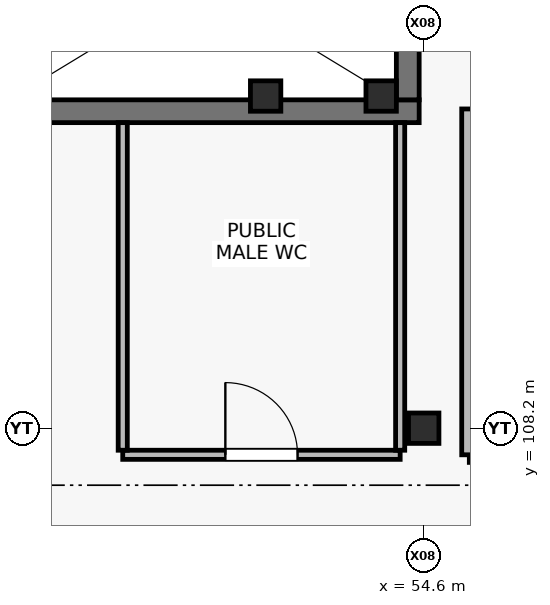
"""IFC4 building model, lengths in metres.
Left out: names, types, materials, properties, quantities, classifications, styles, units other than length and angle.
Written with IfcOpenShell. Run it as: python <this file> out.ifc"""

import sys

from ifc_helpers import new_model, si_unit, direction, frame, frame_2d, origin, origin_2d, place, context, subcontext, project, spatial, rectangle, extrude, element, fill, save


model = new_model("IFC4")
c1 = context("Model", 3, precision=1e-05, world=origin(), true_north=direction((0.0, 1.0)))
c2 = subcontext(c1, "Body", "Model", "MODEL_VIEW")
j1 = project(units=[si_unit("LENGTHUNIT", "METRE"), si_unit("PLANEANGLEUNIT", "RADIAN")], contexts=[c1])
p1 = place(None, origin())
s1 = spatial("IfcSite", under=j1, at=p1, CompositionType="ELEMENT")
p2 = place(p1, origin())
s2 = spatial("IfcBuilding", under=s1, at=p2, CompositionType="ELEMENT")
p3 = place(p2, frame((0.0, 0.0, 23.1)))
s3 = spatial("IfcBuildingStorey", under=s2, at=p3, CompositionType="ELEMENT", Elevation=23.1)
for number, where, z_axis, x_axis in (
    (1, (54.6, 108.2, 0.0), (0.0, 0.0, 1.0), (1.0, 0.0, 0.0)),
    (2, (52.52, 112.57, 0.0), (0.0, 0.0, 1.0), (1.0, 0.0, 0.0)),
    (3, (54.04, 112.57, 0.0), (0.0, 0.0, 1.0), (1.0, 0.0, 0.0)),
):
    element("IfcColumn", number, at=place(p3, frame(where, z_axis=z_axis, x_axis=x_axis)), inside=s3, PredefinedType="COLUMN", context=c2, shape_type="SweptSolid", body=[
        extrude(rectangle(XDim=0.4, YDim=0.4, at=origin_2d()), origin(), (0.0, 0.0, 1.0), 4.2),
    ])
p4 = place(p3, frame((46.95, 112.37, 0.0), z_axis=(0.0, 0.0, 1.0), x_axis=(1.0, 0.0, 0.0)))
e4 = element("IfcWall", 4, at=p4, inside=s3, PredefinedType="SHEAR", context=c2, shape_type="SweptSolid", body=[
    extrude(rectangle(XDim=7.59, YDim=0.3, at=frame_2d((3.795, 0.0))), origin(), (0.0, 0.0, 1.0), 3.94),
])
p5 = place(p4, frame((0.59, 0.0, 0.0)))
e5 = element("IfcOpeningElement", 5, at=p5, cuts=e4, PredefinedType="OPENING", context=c2, shape_type="SweptSolid", body=[
    extrude(rectangle(XDim=1.4, YDim=2.2, at=frame_2d((0.7, 1.1))), frame((0.0, 0.16, 0.0), z_axis=(0.0, -1.0, 0.0), x_axis=(1.0, 0.0, 0.0)), (0.0, 0.0, 1.0), 0.32),
])
p6 = place(p3, frame((54.39, 112.52, 0.0), z_axis=(0.0, 0.0, 1.0), x_axis=(0.0, 1.0, 0.0)))
e6 = element("IfcWall", 6, at=p6, inside=s3, PredefinedType="SHEAR", context=c2, shape_type="SweptSolid", body=[
    extrude(rectangle(XDim=3.33, YDim=0.3, at=frame_2d((1.665, 0.0))), origin(), (0.0, 0.0, 1.0), 3.94),
])
p7 = place(p3, frame((55.2, 107.85, 0.0), z_axis=(0.0, 0.0, 1.0), x_axis=(1.0, 0.0, 0.0)))
e7 = element("IfcWall", 7, at=p7, inside=s3, PredefinedType="SOLIDWALL", context=c2, shape_type="SweptSolid", body=[
    extrude(rectangle(XDim=6.6, YDim=0.2, at=frame_2d((3.3, 0.0))), origin(), (0.0, 0.0, 1.0), 3.94),
])
p8 = place(p7, frame((2.55, 0.0, 0.0)))
e8 = element("IfcOpeningElement", 8, at=p8, cuts=e7, PredefinedType="OPENING", context=c2, shape_type="SweptSolid", body=[
    extrude(rectangle(XDim=1.5, YDim=2.2, at=frame_2d((0.75, 1.1))), frame((0.0, 0.11, 0.0), z_axis=(0.0, -1.0, 0.0), x_axis=(1.0, 0.0, 0.0)), (0.0, 0.0, 1.0), 0.22),
])
p9 = place(p3, frame((55.2, 112.4, 0.0), z_axis=(0.0, 0.0, 1.0), x_axis=(0.0, -1.0, 0.0)))
e9 = element("IfcWall", 9, at=p9, inside=s3, PredefinedType="SOLIDWALL", context=c2, shape_type="SweptSolid", body=[
    extrude(rectangle(XDim=4.55, YDim=0.2, at=frame_2d((2.275, 0.0))), origin(), (0.0, 0.0, 1.0), 3.94),
])
p10 = place(p3, frame((50.64, 107.85, 0.0), z_axis=(0.0, 0.0, 1.0), x_axis=(1.0, 0.0, 0.0)))
e10 = element("IfcWall", 10, at=p10, inside=s3, PredefinedType="PARTITIONING", context=c2, shape_type="SweptSolid", body=[
    extrude(rectangle(XDim=3.65, YDim=0.12, at=frame_2d((1.825, 0.0))), origin(), (0.0, 0.0, 1.0), 3.94),
])
p11 = place(p10, frame((1.35, 0.0, 0.0)))
e11 = element("IfcOpeningElement", 11, at=p11, cuts=e10, PredefinedType="OPENING", context=c2, shape_type="SweptSolid", body=[
    extrude(rectangle(XDim=0.95, YDim=2.1, at=frame_2d((0.475, 1.05))), frame((0.0, 0.07, 0.0), z_axis=(0.0, -1.0, 0.0), x_axis=(1.0, 0.0, 0.0)), (0.0, 0.0, 1.0), 0.14),
])
p12 = place(p3, frame((50.64, 107.91, 0.0), z_axis=(0.0, 0.0, 1.0), x_axis=(0.0, 1.0, 0.0)))
e12 = element("IfcWall", 12, at=p12, inside=s3, PredefinedType="PARTITIONING", context=c2, shape_type="SweptSolid", body=[
    extrude(rectangle(XDim=4.31, YDim=0.12, at=frame_2d((2.155, 0.0))), origin(), (0.0, 0.0, 1.0), 3.94),
])
p13 = place(p3, frame((54.29, 107.91, 0.0), z_axis=(0.0, 0.0, 1.0), x_axis=(0.0, 1.0, 0.0)))
e13 = element("IfcWall", 13, at=p13, inside=s3, PredefinedType="PARTITIONING", context=c2, shape_type="SweptSolid", body=[
    extrude(rectangle(XDim=4.31, YDim=0.12, at=frame_2d((2.155, 0.0))), origin(), (0.0, 0.0, 1.0), 3.65),
])
p14 = place(p11, origin())
e14 = element("IfcDoor", 14, at=p14, inside=s3, OperationType="SINGLE_SWING_LEFT", PredefinedType="DOOR", context=c2, shape_type="SweptSolid", body=[
    extrude(rectangle(XDim=0.95, YDim=2.1, at=frame_2d((0.475, 1.05))), frame((0.0, 0.025, 0.0), z_axis=(0.0, -1.0, 0.0), x_axis=(1.0, 0.0, 0.0)), (0.0, 0.0, 1.0), 0.05),
])
fill(e11, e14)
save(model, sys.argv[1])
